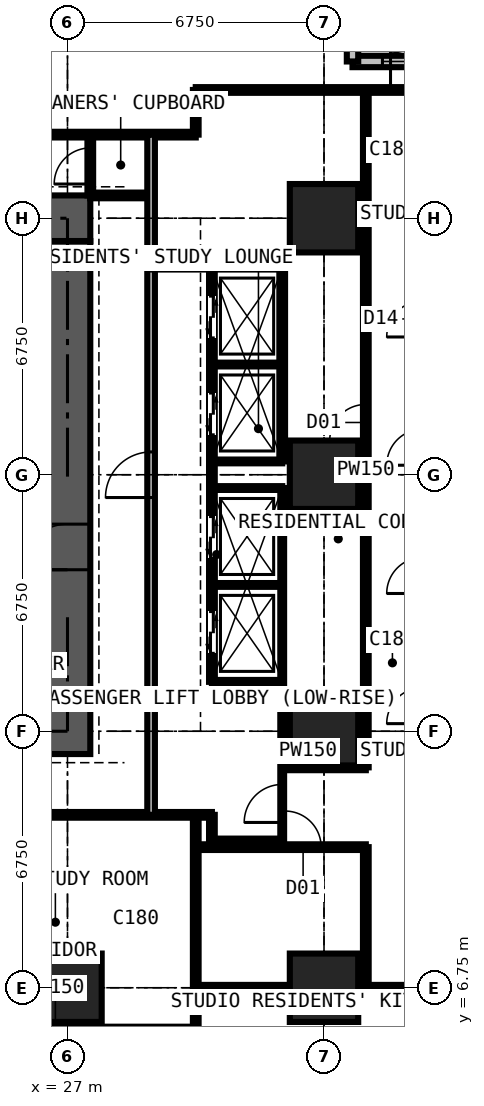
"""IFC4 building model, lengths in metres.
Left out: names, types, materials, properties, quantities, classifications, styles, units other than length and angle.
Written with IfcOpenShell. Run it as: python <this file> out.ifc"""

import sys

from ifc_helpers import new_model, si_unit, direction, frame, frame_2d, origin, origin_2d, place, context, subcontext, project, spatial, rectangle, extrude, element, fill, save


model = new_model("IFC4")
c1 = context("Model", 3, precision=1e-05, world=origin(), true_north=direction((0.0, 1.0)))
c2 = subcontext(c1, "Body", "Model", "MODEL_VIEW")
j1 = project(units=[si_unit("LENGTHUNIT", "METRE"), si_unit("PLANEANGLEUNIT", "RADIAN")], contexts=[c1])
p1 = place(None, origin())
s1 = spatial("IfcSite", under=j1, at=p1, CompositionType="ELEMENT")
p2 = place(p1, origin())
s2 = spatial("IfcBuilding", under=s1, at=p2, CompositionType="ELEMENT")
p3 = place(p2, frame((0.0, 0.0, 101.7)))
s3 = spatial("IfcBuildingStorey", under=s2, at=p3, CompositionType="ELEMENT", Elevation=101.7)
for number, where, z_axis, x_axis in (
    (1, (27.0, 6.75, 0.0), (0.0, 0.0, 1.0), (1.0, 0.0, 0.0)),
    (2, (33.75, 6.75, 0.0), (0.0, 0.0, 1.0), (1.0, 0.0, 0.0)),
    (3, (33.75, 13.5, 0.0), (0.0, 0.0, 1.0), (1.0, 0.0, 0.0)),
    (4, (33.75, 20.25, 0.0), (0.0, 0.0, 1.0), (1.0, 0.0, 0.0)),
    (5, (33.75, 27.0, 0.0), (0.0, 0.0, 1.0), (1.0, 0.0, 0.0)),
):
    element("IfcColumn", number, at=place(p3, frame(where, z_axis=z_axis, x_axis=x_axis)), inside=s3, PredefinedType="COLUMN", context=c2, shape_type="SweptSolid", body=[
        extrude(rectangle(XDim=1.8, YDim=1.8, at=origin_2d()), origin(), (0.0, 0.0, 1.0), 3.6),
    ])
p4 = place(p3, frame((12.9, 13.5, 0.0), z_axis=(0.0, 0.0, 1.0), x_axis=(1.0, 0.0, 0.0)))
e6 = element("IfcWall", 6, at=p4, inside=s3, PredefinedType="SHEAR", context=c2, shape_type="SweptSolid", body=[
    extrude(rectangle(XDim=14.7, YDim=1.2, at=frame_2d((7.35, 0.0))), origin(), (0.0, 0.0, 1.0), 3.6),
])
p5 = place(p3, frame((27.0, 14.1, 0.0), z_axis=(0.0, 0.0, 1.0), x_axis=(0.0, 1.0, 0.0)))
e7 = element("IfcWall", 7, at=p5, inside=s3, PredefinedType="SHEAR", context=c2, shape_type="SweptSolid", body=[
    extrude(rectangle(XDim=12.3, YDim=1.2, at=frame_2d((6.15, 0.0))), origin(), (0.0, 0.0, 1.0), 3.6),
])
p6 = place(p5, frame((3.65, 0.0, 0.0)))
e8 = element("IfcOpeningElement", 8, at=p6, cuts=e7, PredefinedType="OPENING", context=c2, shape_type="SweptSolid", body=[
    extrude(rectangle(XDim=1.2, YDim=2.2, at=frame_2d((0.6, 1.1))), frame((0.0, 0.61, 0.0), z_axis=(0.0, -1.0, 0.0), x_axis=(1.0, 0.0, 0.0)), (0.0, 0.0, 1.0), 1.22),
])
p7 = place(p3, frame((27.6, 27.0, 0.0), z_axis=(0.0, 0.0, 1.0), x_axis=(-1.0, 0.0, 0.0)))
e9 = element("IfcWall", 9, at=p7, inside=s3, PredefinedType="SHEAR", context=c2, shape_type="SweptSolid", body=[
    extrude(rectangle(XDim=14.7, YDim=1.2, at=frame_2d((7.35, 0.0))), origin(), (0.0, 0.0, 1.0), 3.6),
])
p8 = place(p7, frame((5.225, 0.0, 0.0)))
e10 = element("IfcOpeningElement", 10, at=p8, cuts=e9, PredefinedType="OPENING", context=c2, shape_type="SweptSolid", body=[
    extrude(rectangle(XDim=0.9, YDim=2.2, at=frame_2d((0.45, 1.1))), frame((0.0, 0.61, 0.0), z_axis=(0.0, -1.0, 0.0), x_axis=(1.0, 0.0, 0.0)), (0.0, 0.0, 1.0), 1.22),
])
p9 = place(p7, frame((8.2, 0.0, 0.0)))
e11 = element("IfcOpeningElement", 11, at=p9, cuts=e9, PredefinedType="OPENING", context=c2, shape_type="SweptSolid", body=[
    extrude(rectangle(XDim=1.0, YDim=2.2, at=frame_2d((0.5, 1.1))), frame((0.0, 0.61, 0.0), z_axis=(0.0, -1.0, 0.0), x_axis=(1.0, 0.0, 0.0)), (0.0, 0.0, 1.0), 1.22),
])
p10 = place(p3, frame((37.875, 31.125, 0.0), z_axis=(0.0, 0.0, 1.0), x_axis=(-1.0, 0.0, 0.0)))
e12 = element("IfcWall", 12, at=p10, inside=s3, PredefinedType="SOLIDWALL", context=c2, shape_type="SweptSolid", body=[
    extrude(rectangle(XDim=3.375, YDim=0.3, at=frame_2d((1.688, 0.0))), origin(), (0.0, 0.0, 1.0), 3.375),
])
p11 = place(p10, frame((0.788, 0.0, 0.6)))
e13 = element("IfcOpeningElement", 13, at=p11, cuts=e12, PredefinedType="OPENING", context=c2, shape_type="SweptSolid", body=[
    extrude(rectangle(XDim=1.8, YDim=2.1, at=frame_2d((0.9, 1.05))), frame((0.0, 0.16, 0.0), z_axis=(0.0, -1.0, 0.0), x_axis=(1.0, 0.0, 0.0)), (0.0, 0.0, 1.0), 0.32),
])
p12 = place(p3, frame((34.5, 31.125, 0.0), z_axis=(0.0, 0.0, 1.0), x_axis=(0.0, 1.0, 0.0)))
e14 = element("IfcWall", 14, at=p12, inside=s3, PredefinedType="SOLIDWALL", context=c2, shape_type="SweptSolid", body=[
    extrude(rectangle(XDim=3.375, YDim=0.3, at=frame_2d((1.688, 0.0))), origin(), (0.0, 0.0, 1.0), 3.375),
])
p13 = place(p12, frame((0.343, 0.0, 0.9)))
e15 = element("IfcOpeningElement", 15, at=p13, cuts=e14, PredefinedType="OPENING", context=c2, shape_type="SweptSolid", body=[
    extrude(rectangle(XDim=1.2, YDim=1.8, at=frame_2d((0.6, 0.9))), frame((0.0, 0.16, 0.0), z_axis=(0.0, -1.0, 0.0), x_axis=(1.0, 0.0, 0.0)), (0.0, 0.0, 1.0), 0.32),
])
p14 = place(p3, frame((10.125, 11.3, 0.0), z_axis=(0.0, 0.0, 1.0), x_axis=(1.0, 0.0, 0.0)))
e16 = element("IfcWall", 16, at=p14, inside=s3, PredefinedType="PARTITIONING", context=c2, shape_type="SweptSolid", body=[
    extrude(rectangle(XDim=20.675, YDim=0.15, at=frame_2d((10.337, 0.0))), origin(), (0.0, 0.0, 1.0), 3.375),
])
p15 = place(p14, frame((8.375, 0.0, 0.0)))
e17 = element("IfcOpeningElement", 17, at=p15, cuts=e16, PredefinedType="OPENING", context=c2, shape_type="SweptSolid", body=[
    extrude(rectangle(XDim=1.0, YDim=2.2, at=frame_2d((0.5, 1.1))), frame((0.0, 0.085, 0.0), z_axis=(0.0, -1.0, 0.0), x_axis=(1.0, 0.0, 0.0)), (0.0, 0.0, 1.0), 0.17),
])
p16 = place(p14, frame((10.975, 0.0, 0.0)))
e18 = element("IfcOpeningElement", 18, at=p16, cuts=e16, PredefinedType="OPENING", context=c2, shape_type="SweptSolid", body=[
    extrude(rectangle(XDim=1.0, YDim=2.2, at=frame_2d((0.5, 1.1))), frame((0.0, 0.085, 0.0), z_axis=(0.0, -1.0, 0.0), x_axis=(1.0, 0.0, 0.0)), (0.0, 0.0, 1.0), 0.17),
])
p17 = place(p14, frame((3.925, 0.0, 0.0)))
e19 = element("IfcOpeningElement", 19, at=p17, cuts=e16, PredefinedType="OPENING", context=c2, shape_type="SweptSolid", body=[
    extrude(rectangle(XDim=0.95, YDim=2.2, at=frame_2d((0.475, 1.1))), frame((0.0, 0.085, 0.0), z_axis=(0.0, -1.0, 0.0), x_axis=(1.0, 0.0, 0.0)), (0.0, 0.0, 1.0), 0.17),
])
p18 = place(p3, frame((11.3, 29.2, 0.0), z_axis=(0.0, 0.0, 1.0), x_axis=(1.0, 0.0, 0.0)))
e20 = element("IfcWall", 20, at=p18, inside=s3, PredefinedType="PARTITIONING", context=c2, shape_type="SweptSolid", body=[
    extrude(rectangle(XDim=19.075, YDim=0.15, at=frame_2d((9.538, 0.0))), origin(), (0.0, 0.0, 1.0), 3.375),
])
p19 = place(p18, frame((5.825, 0.0, 0.0)))
e21 = element("IfcOpeningElement", 21, at=p19, cuts=e20, PredefinedType="OPENING", context=c2, shape_type="SweptSolid", body=[
    extrude(rectangle(XDim=0.95, YDim=2.2, at=frame_2d((0.475, 1.1))), frame((0.0, 0.085, 0.0), z_axis=(0.0, -1.0, 0.0), x_axis=(1.0, 0.0, 0.0)), (0.0, 0.0, 1.0), 0.17),
])
p20 = place(p18, frame((9.2, 0.0, 0.0)))
e22 = element("IfcOpeningElement", 22, at=p20, cuts=e20, PredefinedType="OPENING", context=c2, shape_type="SweptSolid", body=[
    extrude(rectangle(XDim=0.95, YDim=2.2, at=frame_2d((0.475, 1.1))), frame((0.0, 0.085, 0.0), z_axis=(0.0, -1.0, 0.0), x_axis=(1.0, 0.0, 0.0)), (0.0, 0.0, 1.0), 0.17),
])
p21 = place(p18, frame((0.6, 0.0, 0.0)))
e23 = element("IfcOpeningElement", 23, at=p21, cuts=e20, PredefinedType="OPENING", context=c2, shape_type="SweptSolid", body=[
    extrude(rectangle(XDim=1.0, YDim=2.2, at=frame_2d((0.5, 1.1))), frame((0.0, 0.085, 0.0), z_axis=(0.0, -1.0, 0.0), x_axis=(1.0, 0.0, 0.0)), (0.0, 0.0, 1.0), 0.17),
])
p22 = place(p3, frame((27.6, 27.6, 0.0), z_axis=(0.0, 0.0, 1.0), x_axis=(0.0, 1.0, 0.0)))
e24 = element("IfcWall", 24, at=p22, inside=s3, PredefinedType="PARTITIONING", context=c2, shape_type="SweptSolid", body=[
    extrude(rectangle(XDim=1.6, YDim=0.15, at=frame_2d((0.8, 0.0))), origin(), (0.0, 0.0, 1.0), 3.375),
])
p23 = place(p22, frame((0.3, 0.0, 0.0)))
e25 = element("IfcOpeningElement", 25, at=p23, cuts=e24, PredefinedType="OPENING", context=c2, shape_type="SweptSolid", body=[
    extrude(rectangle(XDim=0.95, YDim=2.2, at=frame_2d((0.475, 1.1))), frame((0.0, 0.085, 0.0), z_axis=(0.0, -1.0, 0.0), x_axis=(1.0, 0.0, 0.0)), (0.0, 0.0, 1.0), 0.17),
])
p24 = place(p3, frame((27.6, 27.6, 0.0), z_axis=(0.0, 0.0, 1.0), x_axis=(1.0, 0.0, 0.0)))
e26 = element("IfcWall", 26, at=p24, inside=s3, PredefinedType="PARTITIONING", context=c2, shape_type="SweptSolid", body=[
    extrude(rectangle(XDim=1.6, YDim=0.15, at=frame_2d((0.8, 0.0))), origin(), (0.0, 0.0, 1.0), 2.806),
])
p25 = place(p3, frame((29.2, 11.3, 0.0), z_axis=(0.0, 0.0, 1.0), x_axis=(0.0, 1.0, 0.0)))
e27 = element("IfcWall", 27, at=p25, inside=s3, PredefinedType="PARTITIONING", context=c2, shape_type="SweptSolid", body=[
    extrude(rectangle(XDim=17.9, YDim=0.2, at=frame_2d((8.95, 0.0))), origin(), (0.0, 0.0, 1.0), 3.375),
])
p26 = place(p25, frame((8.35, 0.0, 0.0)))
e28 = element("IfcOpeningElement", 28, at=p26, cuts=e27, PredefinedType="OPENING", context=c2, shape_type="SweptSolid", body=[
    extrude(rectangle(XDim=1.2, YDim=2.2, at=frame_2d((0.6, 1.1))), frame((0.0, 0.11, 0.0), z_axis=(0.0, -1.0, 0.0), x_axis=(1.0, 0.0, 0.0)), (0.0, 0.0, 1.0), 0.22),
])
p27 = place(p3, frame((29.2, 25.7, 0.0), z_axis=(0.0, 0.0, 1.0), x_axis=(1.0, 0.0, 0.0)))
e29 = element("IfcWall", 29, at=p27, inside=s3, PredefinedType="SHEAR", context=c2, shape_type="SweptSolid", body=[
    extrude(rectangle(XDim=3.45, YDim=0.1, at=frame_2d((1.725, 0.0))), origin(), (0.0, 0.0, 1.0), 3.375),
])
p28 = place(p3, frame((30.375, -0.734, 0.0), z_axis=(0.0, 0.0, 1.0), x_axis=(0.0, 1.0, 0.0)))
e30 = element("IfcWall", 30, at=p28, inside=s3, PredefinedType="PARTITIONING", context=c2, shape_type="SweptSolid", body=[
    extrude(rectangle(XDim=12.034, YDim=0.15, at=frame_2d((6.017, 0.0))), origin(), (0.0, 0.0, 1.0), 3.375),
])
p29 = place(p28, frame((5.134, 0.0, 0.0)))
e31 = element("IfcOpeningElement", 31, at=p29, cuts=e30, PredefinedType="OPENING", context=c2, shape_type="SweptSolid", body=[
    extrude(rectangle(XDim=1.0, YDim=2.2, at=frame_2d((0.5, 1.1))), frame((0.0, 0.085, 0.0), z_axis=(0.0, -1.0, 0.0), x_axis=(1.0, 0.0, 0.0)), (0.0, 0.0, 1.0), 0.17),
])
p30 = place(p3, frame((30.375, 6.75, 0.0), z_axis=(0.0, 0.0, 1.0), x_axis=(1.0, 0.0, 0.0)))
e32 = element("IfcWall", 32, at=p30, inside=s3, PredefinedType="PARTITIONING", context=c2, shape_type="SweptSolid", body=[
    extrude(rectangle(XDim=5.975, YDim=0.15, at=frame_2d((2.988, 0.0))), origin(), (0.0, 0.0, 1.0), 2.877),
])
p31 = place(p3, frame((30.375, 10.45, 0.0), z_axis=(0.0, 0.0, 1.0), x_axis=(1.0, 0.0, 0.0)))
e33 = element("IfcWall", 33, at=p31, inside=s3, PredefinedType="PARTITIONING", context=c2, shape_type="SweptSolid", body=[
    extrude(rectangle(XDim=4.475, YDim=0.15, at=frame_2d((2.238, 0.0))), origin(), (0.0, 0.0, 1.0), 3.375),
])
p32 = place(p31, frame((2.35, 0.0, 0.0)))
e34 = element("IfcOpeningElement", 34, at=p32, cuts=e33, PredefinedType="OPENING", context=c2, shape_type="SweptSolid", body=[
    extrude(rectangle(XDim=0.95, YDim=2.2, at=frame_2d((0.475, 1.1))), frame((0.0, 0.085, 0.0), z_axis=(0.0, -1.0, 0.0), x_axis=(1.0, 0.0, 0.0)), (0.0, 0.0, 1.0), 0.17),
])
p33 = place(p3, frame((30.375, 29.2, 0.0), z_axis=(0.0, 0.0, 1.0), x_axis=(0.0, 1.0, 0.0)))
e35 = element("IfcWall", 35, at=p33, inside=s3, PredefinedType="PARTITIONING", context=c2, shape_type="SweptSolid", body=[
    extrude(rectangle(XDim=1.175, YDim=0.15, at=frame_2d((0.587, 0.0))), origin(), (0.0, 0.0, 1.0), 3.375),
])
p34 = place(p3, frame((30.375, 30.375, 0.0), z_axis=(0.0, 0.0, 1.0), x_axis=(1.0, 0.0, 0.0)))
e36 = element("IfcWall", 36, at=p34, inside=s3, PredefinedType="PARTITIONING", context=c2, shape_type="SweptSolid", body=[
    extrude(rectangle(XDim=7.35, YDim=0.15, at=frame_2d((3.675, 0.0))), origin(), (0.0, 0.0, 1.0), 2.877),
])
p35 = place(p34, frame((5.125, 0.0, 0.0)))
e37 = element("IfcOpeningElement", 37, at=p35, cuts=e36, PredefinedType="OPENING", context=c2, shape_type="SweptSolid", body=[
    extrude(rectangle(XDim=1.0, YDim=2.2, at=frame_2d((0.5, 1.1))), frame((0.0, 0.085, 0.0), z_axis=(0.0, -1.0, 0.0), x_axis=(1.0, 0.0, 0.0)), (0.0, 0.0, 1.0), 0.17),
])
p36 = place(p3, frame((30.8, 10.6, 0.0), z_axis=(0.0, 0.0, 1.0), x_axis=(0.0, 1.0, 0.0)))
e38 = element("IfcWall", 38, at=p36, inside=s3, PredefinedType="PARTITIONING", context=c2, shape_type="SweptSolid", body=[
    extrude(rectangle(XDim=0.7, YDim=0.15, at=frame_2d((0.35, 0.0))), origin(), (0.0, 0.0, 1.0), 3.375),
])
p37 = place(p3, frame((30.8, 10.6, 0.0), z_axis=(0.0, 0.0, 1.0), x_axis=(1.0, 0.0, 0.0)))
e39 = element("IfcWall", 39, at=p37, inside=s3, PredefinedType="PARTITIONING", context=c2, shape_type="SweptSolid", body=[
    extrude(rectangle(XDim=1.85, YDim=0.15, at=frame_2d((0.925, 0.0))), origin(), (0.0, 0.0, 1.0), 3.375),
])
p38 = place(p3, frame((30.8, 14.8, 0.0), z_axis=(0.0, 0.0, 1.0), x_axis=(0.0, 1.0, 0.0)))
e40 = element("IfcWall", 40, at=p38, inside=s3, PredefinedType="PARTITIONING", context=c2, shape_type="SweptSolid", body=[
    extrude(rectangle(XDim=10.9, YDim=0.15, at=frame_2d((5.45, 0.0))), origin(), (0.0, 0.0, 1.0), 3.375),
])
p39 = place(p38, frame((0.75, 0.0, 0.0)))
e41 = element("IfcOpeningElement", 41, at=p39, cuts=e40, PredefinedType="OPENING", context=c2, shape_type="SweptSolid", body=[
    extrude(rectangle(XDim=1.1, YDim=2.2, at=frame_2d((0.55, 1.1))), frame((0.0, 0.085, 0.0), z_axis=(0.0, -1.0, 0.0), x_axis=(1.0, 0.0, 0.0)), (0.0, 0.0, 1.0), 0.17),
])
p40 = place(p38, frame((3.25, 0.0, 0.0)))
e42 = element("IfcOpeningElement", 42, at=p40, cuts=e40, PredefinedType="OPENING", context=c2, shape_type="SweptSolid", body=[
    extrude(rectangle(XDim=1.1, YDim=2.2, at=frame_2d((0.55, 1.1))), frame((0.0, 0.085, 0.0), z_axis=(0.0, -1.0, 0.0), x_axis=(1.0, 0.0, 0.0)), (0.0, 0.0, 1.0), 0.17),
])
p41 = place(p38, frame((6.5, 0.0, 0.0)))
e43 = element("IfcOpeningElement", 43, at=p41, cuts=e40, PredefinedType="OPENING", context=c2, shape_type="SweptSolid", body=[
    extrude(rectangle(XDim=1.1, YDim=2.2, at=frame_2d((0.55, 1.1))), frame((0.0, 0.085, 0.0), z_axis=(0.0, -1.0, 0.0), x_axis=(1.0, 0.0, 0.0)), (0.0, 0.0, 1.0), 0.17),
])
p42 = place(p38, frame((9.05, 0.0, 0.0)))
e44 = element("IfcOpeningElement", 44, at=p42, cuts=e40, PredefinedType="OPENING", context=c2, shape_type="SweptSolid", body=[
    extrude(rectangle(XDim=1.1, YDim=2.2, at=frame_2d((0.55, 1.1))), frame((0.0, 0.085, 0.0), z_axis=(0.0, -1.0, 0.0), x_axis=(1.0, 0.0, 0.0)), (0.0, 0.0, 1.0), 0.17),
])
for number, where, z_axis, x_axis in (
    (45, (30.8, 14.8, 0.0), (0.0, 0.0, 1.0), (1.0, 0.0, 0.0)),
    (46, (30.8, 17.35, 0.0), (0.0, 0.0, 1.0), (1.0, 0.0, 0.0)),
    (47, (30.8, 19.9, 0.0), (0.0, 0.0, 1.0), (1.0, 0.0, 0.0)),
    (48, (30.8, 20.6, 0.0), (0.0, 0.0, 1.0), (1.0, 0.0, 0.0)),
    (49, (30.8, 23.15, 0.0), (0.0, 0.0, 1.0), (1.0, 0.0, 0.0)),
):
    element("IfcWall", number, at=place(p3, frame(where, z_axis=z_axis, x_axis=x_axis)), inside=s3, PredefinedType="SHEAR", context=c2, shape_type="SweptSolid", body=[
        extrude(rectangle(XDim=1.85, YDim=0.1, at=frame_2d((0.925, 0.0))), origin(), (0.0, 0.0, 1.0), 3.375),
    ])
p43 = place(p3, frame((32.65, 10.6, 0.0), z_axis=(0.0, 0.0, 1.0), x_axis=(0.0, 1.0, 0.0)))
e50 = element("IfcWall", 50, at=p43, inside=s3, PredefinedType="SHEAR", context=c2, shape_type="SweptSolid", body=[
    extrude(rectangle(XDim=9.3, YDim=0.1, at=frame_2d((4.65, 0.0))), origin(), (0.0, 0.0, 1.0), 3.375),
])
p44 = place(p43, frame((0.5, 0.0, 0.0)))
e51 = element("IfcOpeningElement", 51, at=p44, cuts=e50, PredefinedType="OPENING", context=c2, shape_type="SweptSolid", body=[
    extrude(rectangle(XDim=1.0, YDim=2.2, at=frame_2d((0.5, 1.1))), frame((0.0, 0.06, 0.0), z_axis=(0.0, -1.0, 0.0), x_axis=(1.0, 0.0, 0.0)), (0.0, 0.0, 1.0), 0.12),
])
p45 = place(p3, frame((32.65, 12.55, 0.0), z_axis=(0.0, 0.0, 1.0), x_axis=(1.0, 0.0, 0.0)))
e52 = element("IfcWall", 52, at=p45, inside=s3, PredefinedType="PARTITIONING", context=c2, shape_type="SweptSolid", body=[
    extrude(rectangle(XDim=2.2, YDim=0.15, at=frame_2d((1.1, 0.0))), origin(), (0.0, 0.0, 1.0), 3.375),
])
p46 = place(p3, frame((32.65, 20.6, 0.0), z_axis=(0.0, 0.0, 1.0), x_axis=(0.0, 1.0, 0.0)))
e53 = element("IfcWall", 53, at=p46, inside=s3, PredefinedType="PARTITIONING", context=c2, shape_type="SweptSolid", body=[
    extrude(rectangle(XDim=5.1, YDim=0.15, at=frame_2d((2.55, 0.0))), origin(), (0.0, 0.0, 1.0), 3.375),
])
p47 = place(p3, frame((34.85, 6.75, 0.0), z_axis=(0.0, 0.0, 1.0), x_axis=(0.0, 1.0, 0.0)))
e54 = element("IfcWall", 54, at=p47, inside=s3, PredefinedType="PARTITIONING", context=c2, shape_type="SweptSolid", body=[
    extrude(rectangle(XDim=3.7, YDim=0.15, at=frame_2d((1.85, 0.0))), origin(), (0.0, 0.0, 1.0), 3.375),
])
p48 = place(p3, frame((34.85, 12.55, 0.0), z_axis=(0.0, 0.0, 1.0), x_axis=(0.0, 1.0, 0.0)))
e55 = element("IfcWall", 55, at=p48, inside=s3, PredefinedType="PARTITIONING", context=c2, shape_type="SweptSolid", body=[
    extrude(rectangle(XDim=17.825, YDim=0.15, at=frame_2d((8.913, 0.0))), origin(), (0.0, 0.0, 1.0), 3.375),
])
p49 = place(p48, frame((8.6, 0.0, 0.0)))
e56 = element("IfcOpeningElement", 56, at=p49, cuts=e55, PredefinedType="OPENING", context=c2, shape_type="SweptSolid", body=[
    extrude(rectangle(XDim=0.95, YDim=2.2, at=frame_2d((0.475, 1.1))), frame((0.0, 0.085, 0.0), z_axis=(0.0, -1.0, 0.0), x_axis=(1.0, 0.0, 0.0)), (0.0, 0.0, 1.0), 0.17),
])
p50 = place(p11, origin())
e57 = element("IfcWindow", 57, at=p50, inside=s3, PartitioningType="SINGLE_PANEL", PredefinedType="WINDOW", context=c2, shape_type="SweptSolid", body=[
    extrude(rectangle(XDim=1.8, YDim=2.1, at=frame_2d((0.9, 1.05))), frame((0.0, 0.03, 0.0), z_axis=(0.0, -1.0, 0.0), x_axis=(1.0, 0.0, 0.0)), (0.0, 0.0, 1.0), 0.06),
])
fill(e13, e57)
p51 = place(p6, origin())
e58 = element("IfcDoor", 58, at=p51, inside=s3, OperationType="DOUBLE_DOOR_SINGLE_SWING", PredefinedType="DOOR", context=c2, shape_type="SweptSolid", body=[
    extrude(rectangle(XDim=1.2, YDim=2.2, at=frame_2d((0.6, 1.1))), frame((0.0, 0.025, 0.0), z_axis=(0.0, -1.0, 0.0), x_axis=(1.0, 0.0, 0.0)), (0.0, 0.0, 1.0), 0.05),
])
fill(e8, e58)
p52 = place(p23, origin())
e59 = element("IfcDoor", 59, at=p52, inside=s3, OperationType="SINGLE_SWING_LEFT", PredefinedType="DOOR", context=c2, shape_type="SweptSolid", body=[
    extrude(rectangle(XDim=0.95, YDim=2.2, at=frame_2d((0.475, 1.1))), frame((0.0, 0.025, 0.0), z_axis=(0.0, -1.0, 0.0), x_axis=(1.0, 0.0, 0.0)), (0.0, 0.0, 1.0), 0.05),
])
fill(e25, e59)
p53 = place(p44, origin())
e60 = element("IfcDoor", 60, at=p53, inside=s3, OperationType="SINGLE_SWING_LEFT", PredefinedType="DOOR", context=c2, shape_type="SweptSolid", body=[
    extrude(rectangle(XDim=1.0, YDim=2.2, at=frame_2d((0.5, 1.1))), frame((0.0, 0.025, 0.0), z_axis=(0.0, -1.0, 0.0), x_axis=(1.0, 0.0, 0.0)), (0.0, 0.0, 1.0), 0.05),
])
fill(e51, e60)
p54 = place(p49, origin())
e61 = element("IfcDoor", 61, at=p54, inside=s3, OperationType="SINGLE_SWING_LEFT", PredefinedType="DOOR", context=c2, shape_type="SweptSolid", body=[
    extrude(rectangle(XDim=0.95, YDim=2.2, at=frame_2d((0.475, 1.1))), frame((0.0, 0.025, 0.0), z_axis=(0.0, -1.0, 0.0), x_axis=(1.0, 0.0, 0.0)), (0.0, 0.0, 1.0), 0.05),
])
fill(e56, e61)
p55 = place(p32, origin())
e62 = element("IfcDoor", 62, at=p55, inside=s3, OperationType="SINGLE_SWING_LEFT", PredefinedType="DOOR", context=c2, shape_type="SweptSolid", body=[
    extrude(rectangle(XDim=0.95, YDim=2.2, at=frame_2d((0.475, 1.1))), frame((0.0, 0.025, 0.0), z_axis=(0.0, -1.0, 0.0), x_axis=(1.0, 0.0, 0.0)), (0.0, 0.0, 1.0), 0.05),
])
fill(e34, e62)
p56 = place(p35, origin())
e63 = element("IfcDoor", 63, at=p56, inside=s3, OperationType="SINGLE_SWING_LEFT", PredefinedType="DOOR", context=c2, shape_type="SweptSolid", body=[
    extrude(rectangle(XDim=1.0, YDim=2.2, at=frame_2d((0.5, 1.1))), frame((0.0, 0.025, 0.0), z_axis=(0.0, -1.0, 0.0), x_axis=(1.0, 0.0, 0.0)), (0.0, 0.0, 1.0), 0.05),
])
fill(e37, e63)
p57 = place(p39, origin())
e64 = element("IfcDoor", 64, at=p57, inside=s3, OperationType="DOUBLE_DOOR_SLIDING", PredefinedType="DOOR", context=c2, shape_type="SweptSolid", body=[
    extrude(rectangle(XDim=1.1, YDim=2.2, at=frame_2d((0.55, 1.1))), frame((0.0, 0.025, 0.0), z_axis=(0.0, -1.0, 0.0), x_axis=(1.0, 0.0, 0.0)), (0.0, 0.0, 1.0), 0.05),
])
fill(e41, e64)
p58 = place(p40, origin())
e65 = element("IfcDoor", 65, at=p58, inside=s3, OperationType="DOUBLE_DOOR_SLIDING", PredefinedType="DOOR", context=c2, shape_type="SweptSolid", body=[
    extrude(rectangle(XDim=1.1, YDim=2.2, at=frame_2d((0.55, 1.1))), frame((0.0, 0.025, 0.0), z_axis=(0.0, -1.0, 0.0), x_axis=(1.0, 0.0, 0.0)), (0.0, 0.0, 1.0), 0.05),
])
fill(e42, e65)
p59 = place(p41, origin())
e66 = element("IfcDoor", 66, at=p59, inside=s3, OperationType="DOUBLE_DOOR_SLIDING", PredefinedType="DOOR", context=c2, shape_type="SweptSolid", body=[
    extrude(rectangle(XDim=1.1, YDim=2.2, at=frame_2d((0.55, 1.1))), frame((0.0, 0.025, 0.0), z_axis=(0.0, -1.0, 0.0), x_axis=(1.0, 0.0, 0.0)), (0.0, 0.0, 1.0), 0.05),
])
fill(e43, e66)
p60 = place(p42, origin())
e67 = element("IfcDoor", 67, at=p60, inside=s3, OperationType="DOUBLE_DOOR_SLIDING", PredefinedType="DOOR", context=c2, shape_type="SweptSolid", body=[
    extrude(rectangle(XDim=1.1, YDim=2.2, at=frame_2d((0.55, 1.1))), frame((0.0, 0.025, 0.0), z_axis=(0.0, -1.0, 0.0), x_axis=(1.0, 0.0, 0.0)), (0.0, 0.0, 1.0), 0.05),
])
fill(e44, e67)
p61 = place(p26, origin())
e68 = element("IfcDoor", 68, at=p61, inside=s3, OperationType="DOUBLE_DOOR_SINGLE_SWING", PredefinedType="DOOR", context=c2, shape_type="SweptSolid", body=[
    extrude(rectangle(XDim=1.2, YDim=2.2, at=frame_2d((0.6, 1.1))), frame((0.0, 0.025, 0.0), z_axis=(0.0, -1.0, 0.0), x_axis=(1.0, 0.0, 0.0)), (0.0, 0.0, 1.0), 0.05),
])
fill(e28, e68)
save(model, sys.argv[1])
